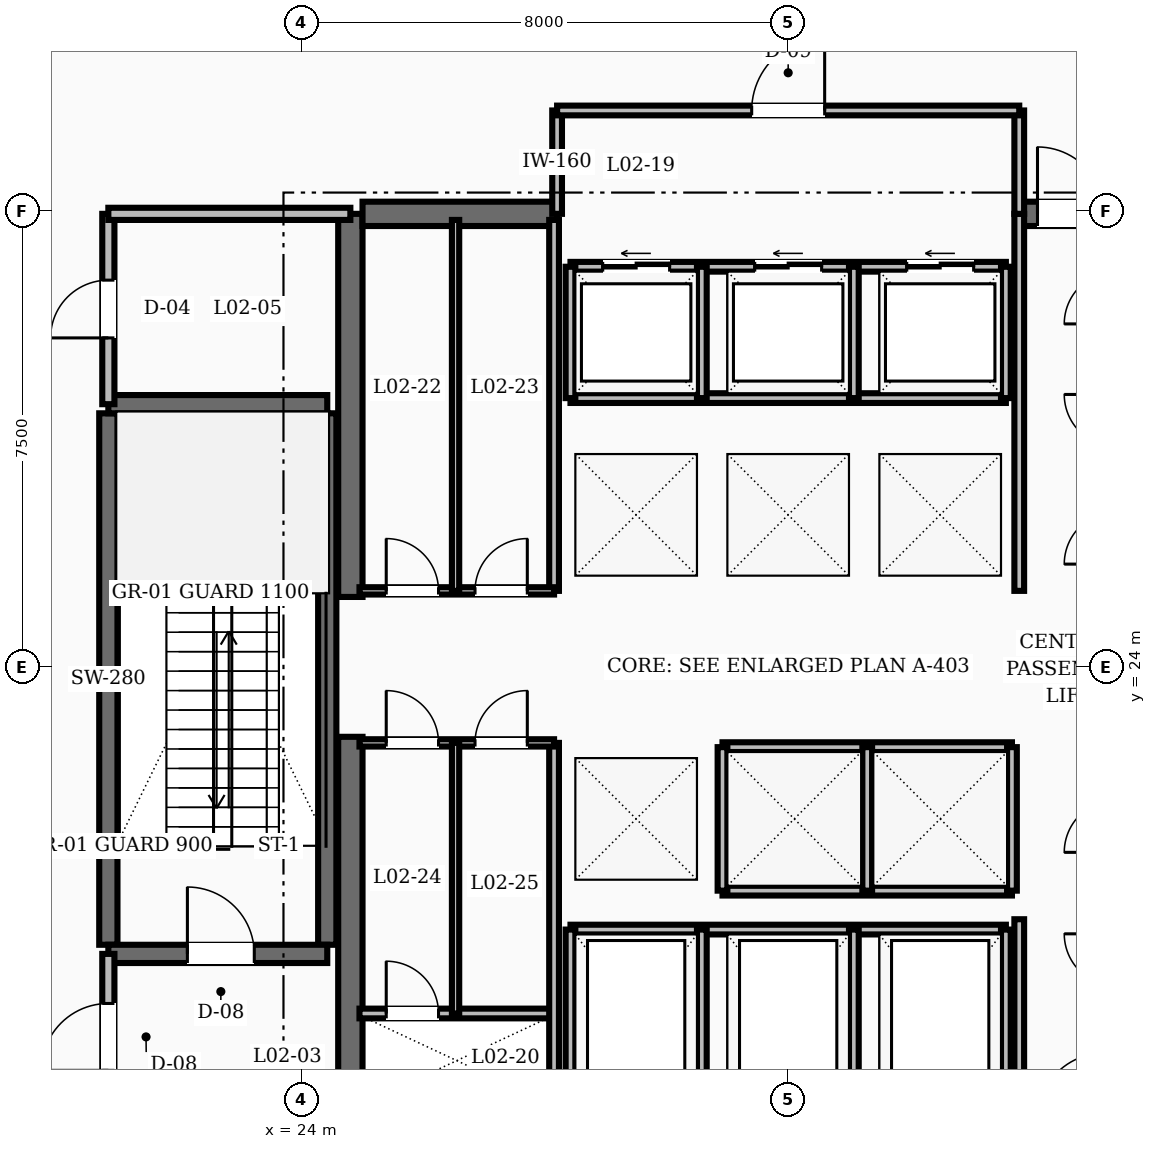
"""IFC4 building model, lengths in metres.
Left out: names, types, materials, properties, quantities, classifications, styles, units other than length and angle.
Written with IfcOpenShell. Run it as: python <this file> out.ifc"""

import sys

from ifc_helpers import new_model, si_unit, direction, frame, frame_2d, origin, place, context, subcontext, project, spatial, rectangle, extrude, element, fill, save


model = new_model("IFC4")
c1 = context("Model", 3, precision=1e-05, world=origin(), true_north=direction((0.0, 1.0)))
c2 = subcontext(c1, "Body", "Model", "MODEL_VIEW")
j1 = project(units=[si_unit("LENGTHUNIT", "METRE"), si_unit("PLANEANGLEUNIT", "RADIAN")], contexts=[c1])
p1 = place(None, origin())
s1 = spatial("IfcSite", under=j1, at=p1, CompositionType="ELEMENT")
p2 = place(p1, origin())
s2 = spatial("IfcBuilding", under=s1, at=p2, CompositionType="ELEMENT")
p3 = place(p2, frame((0.0, 0.0, 10.0)))
s3 = spatial("IfcBuildingStorey", under=s2, at=p3, CompositionType="ELEMENT", Elevation=10.0)
for number, where, z_axis, x_axis in (
    (1, (24.8, 16.55, 0.0), (0.0, 0.0, 1.0), (0.0, 1.0, 0.0)),
    (2, (24.8, 25.15, 0.0), (0.0, 0.0, 1.0), (0.0, 1.0, 0.0)),
):
    element("IfcWall", number, at=place(p3, frame(where, z_axis=z_axis, x_axis=x_axis)), inside=s3, PredefinedType="SHEAR", context=c2, shape_type="SweptSolid", body=[
        extrude(rectangle(XDim=6.3, YDim=0.4, at=frame_2d((3.15, 0.0))), origin(), (0.0, 0.0, 1.0), 4.8),
    ])
p4 = place(p3, frame((25.0, 31.45, 0.0), z_axis=(0.0, 0.0, 1.0), x_axis=(1.0, 0.0, 0.0)))
e3 = element("IfcWall", 3, at=p4, inside=s3, PredefinedType="SHEAR", context=c2, shape_type="SweptSolid", body=[
    extrude(rectangle(XDim=3.2, YDim=0.4, at=frame_2d((1.6, 0.0))), origin(), (0.0, 0.0, 1.0), 4.8),
])
p5 = place(p3, frame((35.8, 31.45, 0.0), z_axis=(0.0, 0.0, 1.0), x_axis=(1.0, 0.0, 0.0)))
e4 = element("IfcWall", 4, at=p5, inside=s3, PredefinedType="SHEAR", context=c2, shape_type="SweptSolid", body=[
    extrude(rectangle(XDim=3.2, YDim=0.4, at=frame_2d((1.6, 0.0))), origin(), (0.0, 0.0, 1.0), 4.8),
])
p6 = place(p5, frame((0.3, 0.0, 0.0)))
e5 = element("IfcOpeningElement", 5, at=p6, cuts=e4, PredefinedType="OPENING", context=c2, shape_type="SweptSolid", body=[
    extrude(rectangle(XDim=1.1, YDim=2.1, at=frame_2d((0.55, 1.05))), frame((0.0, 0.21, 0.0), z_axis=(0.0, -1.0, 0.0), x_axis=(1.0, 0.0, 0.0)), (0.0, 0.0, 1.0), 0.42),
])
for number, where, z_axis, x_axis in (
    (6, (20.82, 19.43, 0.0), (0.0, 0.0, 1.0), (0.0, 1.0, 0.0)),
    (7, (24.42, 19.43, 0.0), (0.0, 0.0, 1.0), (0.0, 1.0, 0.0)),
):
    element("IfcWall", number, at=place(p3, frame(where, z_axis=z_axis, x_axis=x_axis)), inside=s3, PredefinedType="SHEAR", context=c2, shape_type="SweptSolid", body=[
        extrude(rectangle(XDim=8.74, YDim=0.3, at=frame_2d((4.37, 0.0))), origin(), (0.0, 0.0, 1.0), 4.8),
    ])
p7 = place(p3, frame((20.82, 19.28, 0.0), z_axis=(0.0, 0.0, 1.0), x_axis=(1.0, 0.0, 0.0)))
e8 = element("IfcWall", 8, at=p7, inside=s3, PredefinedType="SHEAR", context=c2, shape_type="SweptSolid", body=[
    extrude(rectangle(XDim=3.6, YDim=0.3, at=frame_2d((1.8, 0.0))), origin(), (0.0, 0.0, 1.0), 4.8),
])
p8 = place(p7, frame((1.3, 0.0, 0.0)))
e9 = element("IfcOpeningElement", 9, at=p8, cuts=e8, PredefinedType="OPENING", context=c2, shape_type="SweptSolid", body=[
    extrude(rectangle(XDim=1.1, YDim=2.1, at=frame_2d((0.55, 1.05))), frame((0.0, 0.16, 0.0), z_axis=(0.0, -1.0, 0.0), x_axis=(1.0, 0.0, 0.0)), (0.0, 0.0, 1.0), 0.32),
])
p9 = place(p3, frame((20.82, 28.32, 0.0), z_axis=(0.0, 0.0, 1.0), x_axis=(1.0, 0.0, 0.0)))
e10 = element("IfcWall", 10, at=p9, inside=s3, PredefinedType="SHEAR", context=c2, shape_type="SweptSolid", body=[
    extrude(rectangle(XDim=3.6, YDim=0.3, at=frame_2d((1.8, 0.0))), origin(), (0.0, 0.0, 1.0), 4.8),
])
p10 = place(p3, frame((20.82, 16.55, 0.0), z_axis=(0.0, 0.0, 1.0), x_axis=(0.0, 1.0, 0.0)))
e11 = element("IfcWall", 11, at=p10, inside=s3, PredefinedType="SOLIDWALL", context=c2, shape_type="SweptSolid", body=[
    extrude(rectangle(XDim=2.73, YDim=0.2, at=frame_2d((1.365, 0.0))), origin(), (0.0, 0.0, 1.0), 3.52),
])
p11 = place(p10, frame((0.815, 0.0, 0.0)))
e12 = element("IfcOpeningElement", 12, at=p11, cuts=e11, PredefinedType="OPENING", context=c2, shape_type="SweptSolid", body=[
    extrude(rectangle(XDim=1.1, YDim=2.1, at=frame_2d((0.55, 1.05))), frame((0.0, 0.11, 0.0), z_axis=(0.0, -1.0, 0.0), x_axis=(1.0, 0.0, 0.0)), (0.0, 0.0, 1.0), 0.22),
])
p12 = place(p3, frame((20.82, 28.32, 0.0), z_axis=(0.0, 0.0, 1.0), x_axis=(0.0, 1.0, 0.0)))
e13 = element("IfcWall", 13, at=p12, inside=s3, PredefinedType="SOLIDWALL", context=c2, shape_type="SweptSolid", body=[
    extrude(rectangle(XDim=3.13, YDim=0.2, at=frame_2d((1.565, 0.0))), origin(), (0.0, 0.0, 1.0), 3.52),
])
p13 = place(p12, frame((1.09, 0.0, 0.0)))
e14 = element("IfcOpeningElement", 14, at=p13, cuts=e13, PredefinedType="OPENING", context=c2, shape_type="SweptSolid", body=[
    extrude(rectangle(XDim=0.95, YDim=2.1, at=frame_2d((0.475, 1.05))), frame((0.0, 0.11, 0.0), z_axis=(0.0, -1.0, 0.0), x_axis=(1.0, 0.0, 0.0)), (0.0, 0.0, 1.0), 0.22),
])
p14 = place(p3, frame((20.82, 31.45, 0.0), z_axis=(0.0, 0.0, 1.0), x_axis=(1.0, 0.0, 0.0)))
e15 = element("IfcWall", 15, at=p14, inside=s3, PredefinedType="SOLIDWALL", context=c2, shape_type="SweptSolid", body=[
    extrude(rectangle(XDim=3.98, YDim=0.2, at=frame_2d((1.99, 0.0))), origin(), (0.0, 0.0, 1.0), 3.52),
])
p15 = place(p3, frame((35.8, 16.55, 0.0), z_axis=(0.0, 0.0, 1.0), x_axis=(0.0, 1.0, 0.0)))
e16 = element("IfcWall", 16, at=p15, inside=s3, PredefinedType="SOLIDWALL", context=c2, shape_type="SweptSolid", body=[
    extrude(rectangle(XDim=3.3, YDim=0.16, at=frame_2d((1.65, 0.0))), origin(), (0.0, 0.0, 1.0), 3.52),
])
p16 = place(p3, frame((35.8, 25.25, 0.0), z_axis=(0.0, 0.0, 1.0), x_axis=(0.0, 1.0, 0.0)))
e17 = element("IfcWall", 17, at=p16, inside=s3, PredefinedType="SOLIDWALL", context=c2, shape_type="SweptSolid", body=[
    extrude(rectangle(XDim=6.2, YDim=0.16, at=frame_2d((3.1, 0.0))), origin(), (0.0, 0.0, 1.0), 3.52),
])
p17 = place(p3, frame((28.42, 30.58, 0.0), z_axis=(0.0, 0.0, 1.0), x_axis=(1.0, 0.0, 0.0)))
e18 = element("IfcWall", 18, at=p17, inside=s3, PredefinedType="SOLIDWALL", context=c2, shape_type="SweptSolid", body=[
    extrude(rectangle(XDim=7.16, YDim=0.16, at=frame_2d((3.58, 0.0))), origin(), (0.0, 0.0, 1.0), 3.52),
])
p18 = place(p17, frame((0.53, 0.0, 0.0)))
e19 = element("IfcOpeningElement", 19, at=p18, cuts=e18, PredefinedType="OPENING", context=c2, shape_type="SweptSolid", body=[
    extrude(rectangle(XDim=1.1, YDim=2.15, at=frame_2d((0.55, 1.075))), frame((0.0, 0.09, 0.0), z_axis=(0.0, -1.0, 0.0), x_axis=(1.0, 0.0, 0.0)), (0.0, 0.0, 1.0), 0.18),
])
p19 = place(p17, frame((3.03, 0.0, 0.0)))
e20 = element("IfcOpeningElement", 20, at=p19, cuts=e18, PredefinedType="OPENING", context=c2, shape_type="SweptSolid", body=[
    extrude(rectangle(XDim=1.1, YDim=2.15, at=frame_2d((0.55, 1.075))), frame((0.0, 0.09, 0.0), z_axis=(0.0, -1.0, 0.0), x_axis=(1.0, 0.0, 0.0)), (0.0, 0.0, 1.0), 0.18),
])
p20 = place(p17, frame((5.53, 0.0, 0.0)))
e21 = element("IfcOpeningElement", 21, at=p20, cuts=e18, PredefinedType="OPENING", context=c2, shape_type="SweptSolid", body=[
    extrude(rectangle(XDim=1.1, YDim=2.15, at=frame_2d((0.55, 1.075))), frame((0.0, 0.09, 0.0), z_axis=(0.0, -1.0, 0.0), x_axis=(1.0, 0.0, 0.0)), (0.0, 0.0, 1.0), 0.18),
])
p21 = place(p3, frame((28.42, 28.42, 0.0), z_axis=(0.0, 0.0, 1.0), x_axis=(1.0, 0.0, 0.0)))
e22 = element("IfcWall", 22, at=p21, inside=s3, PredefinedType="SOLIDWALL", context=c2, shape_type="SweptSolid", body=[
    extrude(rectangle(XDim=7.16, YDim=0.16, at=frame_2d((3.58, 0.0))), origin(), (0.0, 0.0, 1.0), 3.52),
])
for number, where, z_axis, x_axis in (
    (23, (28.42, 28.42, 0.0), (0.0, 0.0, 1.0), (0.0, 1.0, 0.0)),
    (24, (30.58, 28.42, 0.0), (0.0, 0.0, 1.0), (0.0, 1.0, 0.0)),
    (25, (33.08, 28.42, 0.0), (0.0, 0.0, 1.0), (0.0, 1.0, 0.0)),
    (26, (35.58, 28.42, 0.0), (0.0, 0.0, 1.0), (0.0, 1.0, 0.0)),
):
    element("IfcWall", number, at=place(p3, frame(where, z_axis=z_axis, x_axis=x_axis)), inside=s3, PredefinedType="SOLIDWALL", context=c2, shape_type="SweptSolid", body=[
        extrude(rectangle(XDim=2.16, YDim=0.16, at=frame_2d((1.08, 0.0))), origin(), (0.0, 0.0, 1.0), 3.52),
    ])
for number, where, z_axis, x_axis in (
    (27, (30.92, 22.68, 0.0), (0.0, 0.0, 1.0), (1.0, 0.0, 0.0)),
    (28, (30.92, 20.32, 0.0), (0.0, 0.0, 1.0), (1.0, 0.0, 0.0)),
):
    element("IfcWall", number, at=place(p3, frame(where, z_axis=z_axis, x_axis=x_axis)), inside=s3, PredefinedType="SOLIDWALL", context=c2, shape_type="SweptSolid", body=[
        extrude(rectangle(XDim=4.76, YDim=0.16, at=frame_2d((2.38, 0.0))), origin(), (0.0, 0.0, 1.0), 3.52),
    ])
for number, where, z_axis, x_axis in (
    (29, (30.92, 20.32, 0.0), (0.0, 0.0, 1.0), (0.0, 1.0, 0.0)),
    (30, (33.3, 20.32, 0.0), (0.0, 0.0, 1.0), (0.0, 1.0, 0.0)),
    (31, (35.68, 20.32, 0.0), (0.0, 0.0, 1.0), (0.0, 1.0, 0.0)),
):
    element("IfcWall", number, at=place(p3, frame(where, z_axis=z_axis, x_axis=x_axis)), inside=s3, PredefinedType="SOLIDWALL", context=c2, shape_type="SweptSolid", body=[
        extrude(rectangle(XDim=2.36, YDim=0.16, at=frame_2d((1.18, 0.0))), origin(), (0.0, 0.0, 1.0), 3.52),
    ])
p22 = place(p3, frame((28.42, 19.68, 0.0), z_axis=(0.0, 0.0, 1.0), x_axis=(1.0, 0.0, 0.0)))
e32 = element("IfcWall", 32, at=p22, inside=s3, PredefinedType="SOLIDWALL", context=c2, shape_type="SweptSolid", body=[
    extrude(rectangle(XDim=7.16, YDim=0.16, at=frame_2d((3.58, 0.0))), origin(), (0.0, 0.0, 1.0), 3.52),
])
for number, where, z_axis, x_axis in (
    (33, (28.42, 16.92, 0.0), (0.0, 0.0, 1.0), (0.0, 1.0, 0.0)),
    (34, (30.58, 16.92, 0.0), (0.0, 0.0, 1.0), (0.0, 1.0, 0.0)),
    (35, (33.08, 16.92, 0.0), (0.0, 0.0, 1.0), (0.0, 1.0, 0.0)),
    (36, (35.58, 16.92, 0.0), (0.0, 0.0, 1.0), (0.0, 1.0, 0.0)),
):
    element("IfcWall", number, at=place(p3, frame(where, z_axis=z_axis, x_axis=x_axis)), inside=s3, PredefinedType="SOLIDWALL", context=c2, shape_type="SweptSolid", body=[
        extrude(rectangle(XDim=2.76, YDim=0.16, at=frame_2d((1.38, 0.0))), origin(), (0.0, 0.0, 1.0), 3.52),
    ])
for number, where, z_axis, x_axis in (
    (37, (28.2, 31.45, 0.0), (0.0, 0.0, 1.0), (0.0, 1.0, 0.0)),
    (38, (35.8, 31.45, 0.0), (0.0, 0.0, 1.0), (0.0, 1.0, 0.0)),
):
    element("IfcWall", number, at=place(p3, frame(where, z_axis=z_axis, x_axis=x_axis)), inside=s3, PredefinedType="SOLIDWALL", context=c2, shape_type="SweptSolid", body=[
        extrude(rectangle(XDim=1.7, YDim=0.16, at=frame_2d((0.85, 0.0))), origin(), (0.0, 0.0, 1.0), 3.52),
    ])
p23 = place(p3, frame((28.2, 33.15, 0.0), z_axis=(0.0, 0.0, 1.0), x_axis=(1.0, 0.0, 0.0)))
e39 = element("IfcWall", 39, at=p23, inside=s3, PredefinedType="SOLIDWALL", context=c2, shape_type="SweptSolid", body=[
    extrude(rectangle(XDim=7.6, YDim=0.16, at=frame_2d((3.8, 0.0))), origin(), (0.0, 0.0, 1.0), 3.52),
])
p24 = place(p23, frame((3.2, 0.0, 0.0)))
e40 = element("IfcOpeningElement", 40, at=p24, cuts=e39, PredefinedType="OPENING", context=c2, shape_type="SweptSolid", body=[
    extrude(rectangle(XDim=1.2, YDim=2.1, at=frame_2d((0.6, 1.05))), frame((0.0, 0.09, 0.0), z_axis=(0.0, -1.0, 0.0), x_axis=(1.0, 0.0, 0.0)), (0.0, 0.0, 1.0), 0.18),
])
p25 = place(p3, frame((24.95, 18.3, 0.0), z_axis=(0.0, 0.0, 1.0), x_axis=(1.0, 0.0, 0.0)))
e41 = element("IfcWall", 41, at=p25, inside=s3, PredefinedType="SOLIDWALL", context=c2, shape_type="SweptSolid", body=[
    extrude(rectangle(XDim=3.2, YDim=0.16, at=frame_2d((1.6, 0.0))), origin(), (0.0, 0.0, 1.0), 3.52),
])
p26 = place(p25, frame((0.44, 0.0, 0.0)))
e42 = element("IfcOpeningElement", 42, at=p26, cuts=e41, PredefinedType="OPENING", context=c2, shape_type="SweptSolid", body=[
    extrude(rectangle(XDim=0.86, YDim=2.05, at=frame_2d((0.43, 1.025))), frame((0.0, 0.09, 0.0), z_axis=(0.0, -1.0, 0.0), x_axis=(1.0, 0.0, 0.0)), (0.0, 0.0, 1.0), 0.18),
])
p27 = place(p3, frame((28.15, 16.7, 0.0), z_axis=(0.0, 0.0, 1.0), x_axis=(0.0, 1.0, 0.0)))
e43 = element("IfcWall", 43, at=p27, inside=s3, PredefinedType="SOLIDWALL", context=c2, shape_type="SweptSolid", body=[
    extrude(rectangle(XDim=6.05, YDim=0.16, at=frame_2d((3.025, 0.0))), origin(), (0.0, 0.0, 1.0), 3.52),
])
p28 = place(p3, frame((28.15, 25.25, 0.0), z_axis=(0.0, 0.0, 1.0), x_axis=(0.0, 1.0, 0.0)))
e44 = element("IfcWall", 44, at=p28, inside=s3, PredefinedType="SOLIDWALL", context=c2, shape_type="SweptSolid", body=[
    extrude(rectangle(XDim=6.1, YDim=0.16, at=frame_2d((3.05, 0.0))), origin(), (0.0, 0.0, 1.0), 3.52),
])
p29 = place(p3, frame((24.95, 25.25, 0.0), z_axis=(0.0, 0.0, 1.0), x_axis=(1.0, 0.0, 0.0)))
e45 = element("IfcWall", 45, at=p29, inside=s3, PredefinedType="PARTITIONING", context=c2, shape_type="SweptSolid", body=[
    extrude(rectangle(XDim=3.2, YDim=0.12, at=frame_2d((1.6, 0.0))), origin(), (0.0, 0.0, 1.0), 3.52),
])
p30 = place(p29, frame((0.44, 0.0, 0.0)))
e46 = element("IfcOpeningElement", 46, at=p30, cuts=e45, PredefinedType="OPENING", context=c2, shape_type="SweptSolid", body=[
    extrude(rectangle(XDim=0.86, YDim=2.1, at=frame_2d((0.43, 1.05))), frame((0.0, 0.07, 0.0), z_axis=(0.0, -1.0, 0.0), x_axis=(1.0, 0.0, 0.0)), (0.0, 0.0, 1.0), 0.14),
])
p31 = place(p29, frame((1.9, 0.0, 0.0)))
e47 = element("IfcOpeningElement", 47, at=p31, cuts=e45, PredefinedType="OPENING", context=c2, shape_type="SweptSolid", body=[
    extrude(rectangle(XDim=0.86, YDim=2.1, at=frame_2d((0.43, 1.05))), frame((0.0, 0.07, 0.0), z_axis=(0.0, -1.0, 0.0), x_axis=(1.0, 0.0, 0.0)), (0.0, 0.0, 1.0), 0.14),
])
p32 = place(p3, frame((24.95, 22.75, 0.0), z_axis=(0.0, 0.0, 1.0), x_axis=(1.0, 0.0, 0.0)))
e48 = element("IfcWall", 48, at=p32, inside=s3, PredefinedType="PARTITIONING", context=c2, shape_type="SweptSolid", body=[
    extrude(rectangle(XDim=3.2, YDim=0.12, at=frame_2d((1.6, 0.0))), origin(), (0.0, 0.0, 1.0), 3.52),
])
p33 = place(p32, frame((0.44, 0.0, 0.0)))
e49 = element("IfcOpeningElement", 49, at=p33, cuts=e48, PredefinedType="OPENING", context=c2, shape_type="SweptSolid", body=[
    extrude(rectangle(XDim=0.86, YDim=2.1, at=frame_2d((0.43, 1.05))), frame((0.0, 0.07, 0.0), z_axis=(0.0, -1.0, 0.0), x_axis=(1.0, 0.0, 0.0)), (0.0, 0.0, 1.0), 0.14),
])
p34 = place(p32, frame((1.9, 0.0, 0.0)))
e50 = element("IfcOpeningElement", 50, at=p34, cuts=e48, PredefinedType="OPENING", context=c2, shape_type="SweptSolid", body=[
    extrude(rectangle(XDim=0.86, YDim=2.1, at=frame_2d((0.43, 1.05))), frame((0.0, 0.07, 0.0), z_axis=(0.0, -1.0, 0.0), x_axis=(1.0, 0.0, 0.0)), (0.0, 0.0, 1.0), 0.14),
])
p35 = place(p3, frame((26.53, 25.25, 0.0), z_axis=(0.0, 0.0, 1.0), x_axis=(0.0, 1.0, 0.0)))
e51 = element("IfcWall", 51, at=p35, inside=s3, PredefinedType="PARTITIONING", context=c2, shape_type="SweptSolid", body=[
    extrude(rectangle(XDim=6.1, YDim=0.12, at=frame_2d((3.05, 0.0))), origin(), (0.0, 0.0, 1.0), 3.52),
])
p36 = place(p3, frame((26.53, 18.3, 0.0), z_axis=(0.0, 0.0, 1.0), x_axis=(0.0, 1.0, 0.0)))
e52 = element("IfcWall", 52, at=p36, inside=s3, PredefinedType="PARTITIONING", context=c2, shape_type="SweptSolid", body=[
    extrude(rectangle(XDim=4.45, YDim=0.12, at=frame_2d((2.225, 0.0))), origin(), (0.0, 0.0, 1.0), 3.52),
])
p37 = place(p8, origin())
e53 = element("IfcDoor", 53, at=p37, inside=s3, OperationType="SINGLE_SWING_LEFT", PredefinedType="DOOR", context=c2, shape_type="SweptSolid", body=[
    extrude(rectangle(XDim=1.1, YDim=2.1, at=frame_2d((0.55, 1.05))), frame((0.0, 0.025, 0.0), z_axis=(0.0, -1.0, 0.0), x_axis=(1.0, 0.0, 0.0)), (0.0, 0.0, 1.0), 0.05),
])
fill(e9, e53)
p38 = place(p11, origin())
e54 = element("IfcDoor", 54, at=p38, inside=s3, OperationType="SINGLE_SWING_LEFT", PredefinedType="DOOR", context=c2, shape_type="SweptSolid", body=[
    extrude(rectangle(XDim=1.1, YDim=2.1, at=frame_2d((0.55, 1.05))), frame((0.0, 0.025, 0.0), z_axis=(0.0, -1.0, 0.0), x_axis=(1.0, 0.0, 0.0)), (0.0, 0.0, 1.0), 0.05),
])
fill(e12, e54)
p39 = place(p13, origin())
e55 = element("IfcDoor", 55, at=p39, inside=s3, OperationType="SINGLE_SWING_LEFT", PredefinedType="DOOR", context=c2, shape_type="SweptSolid", body=[
    extrude(rectangle(XDim=0.95, YDim=2.1, at=frame_2d((0.475, 1.05))), frame((0.0, 0.025, 0.0), z_axis=(0.0, -1.0, 0.0), x_axis=(1.0, 0.0, 0.0)), (0.0, 0.0, 1.0), 0.05),
])
fill(e14, e55)
p40 = place(p6, origin())
e56 = element("IfcDoor", 56, at=p40, inside=s3, OperationType="SINGLE_SWING_LEFT", PredefinedType="DOOR", context=c2, shape_type="SweptSolid", body=[
    extrude(rectangle(XDim=1.1, YDim=2.1, at=frame_2d((0.55, 1.05))), frame((0.0, 0.025, 0.0), z_axis=(0.0, -1.0, 0.0), x_axis=(1.0, 0.0, 0.0)), (0.0, 0.0, 1.0), 0.05),
])
fill(e5, e56)
p41 = place(p18, origin())
e57 = element("IfcDoor", 57, at=p41, inside=s3, OperationType="SLIDING_TO_LEFT", PredefinedType="DOOR", context=c2, shape_type="SweptSolid", body=[
    extrude(rectangle(XDim=1.1, YDim=2.15, at=frame_2d((0.55, 1.075))), frame((0.0, 0.025, 0.0), z_axis=(0.0, -1.0, 0.0), x_axis=(1.0, 0.0, 0.0)), (0.0, 0.0, 1.0), 0.05),
])
fill(e19, e57)
p42 = place(p19, origin())
e58 = element("IfcDoor", 58, at=p42, inside=s3, OperationType="SLIDING_TO_LEFT", PredefinedType="DOOR", context=c2, shape_type="SweptSolid", body=[
    extrude(rectangle(XDim=1.1, YDim=2.15, at=frame_2d((0.55, 1.075))), frame((0.0, 0.025, 0.0), z_axis=(0.0, -1.0, 0.0), x_axis=(1.0, 0.0, 0.0)), (0.0, 0.0, 1.0), 0.05),
])
fill(e20, e58)
p43 = place(p20, origin())
e59 = element("IfcDoor", 59, at=p43, inside=s3, OperationType="SLIDING_TO_LEFT", PredefinedType="DOOR", context=c2, shape_type="SweptSolid", body=[
    extrude(rectangle(XDim=1.1, YDim=2.15, at=frame_2d((0.55, 1.075))), frame((0.0, 0.025, 0.0), z_axis=(0.0, -1.0, 0.0), x_axis=(1.0, 0.0, 0.0)), (0.0, 0.0, 1.0), 0.05),
])
fill(e21, e59)
p44 = place(p24, origin())
e60 = element("IfcDoor", 60, at=p44, inside=s3, OperationType="SINGLE_SWING_RIGHT", PredefinedType="DOOR", context=c2, shape_type="SweptSolid", body=[
    extrude(rectangle(XDim=1.2, YDim=2.1, at=frame_2d((0.6, 1.05))), frame((0.0, 0.025, 0.0), z_axis=(0.0, -1.0, 0.0), x_axis=(1.0, 0.0, 0.0)), (0.0, 0.0, 1.0), 0.05),
])
fill(e40, e60)
p45 = place(p26, origin())
e61 = element("IfcDoor", 61, at=p45, inside=s3, OperationType="SINGLE_SWING_LEFT", PredefinedType="TRAPDOOR", context=c2, shape_type="SweptSolid", body=[
    extrude(rectangle(XDim=0.86, YDim=2.05, at=frame_2d((0.43, 1.025))), frame((0.0, 0.025, 0.0), z_axis=(0.0, -1.0, 0.0), x_axis=(1.0, 0.0, 0.0)), (0.0, 0.0, 1.0), 0.05),
])
fill(e42, e61)
p46 = place(p30, origin())
e62 = element("IfcDoor", 62, at=p46, inside=s3, OperationType="SINGLE_SWING_LEFT", PredefinedType="DOOR", context=c2, shape_type="SweptSolid", body=[
    extrude(rectangle(XDim=0.86, YDim=2.1, at=frame_2d((0.43, 1.05))), frame((0.0, 0.025, 0.0), z_axis=(0.0, -1.0, 0.0), x_axis=(1.0, 0.0, 0.0)), (0.0, 0.0, 1.0), 0.05),
])
fill(e46, e62)
p47 = place(p31, origin())
e63 = element("IfcDoor", 63, at=p47, inside=s3, OperationType="SINGLE_SWING_RIGHT", PredefinedType="DOOR", context=c2, shape_type="SweptSolid", body=[
    extrude(rectangle(XDim=0.86, YDim=2.1, at=frame_2d((0.43, 1.05))), frame((0.0, 0.025, 0.0), z_axis=(0.0, -1.0, 0.0), x_axis=(1.0, 0.0, 0.0)), (0.0, 0.0, 1.0), 0.05),
])
fill(e47, e63)
p48 = place(p33, origin())
e64 = element("IfcDoor", 64, at=p48, inside=s3, OperationType="SINGLE_SWING_LEFT", PredefinedType="DOOR", context=c2, shape_type="SweptSolid", body=[
    extrude(rectangle(XDim=0.86, YDim=2.1, at=frame_2d((0.43, 1.05))), frame((0.0, 0.025, 0.0), z_axis=(0.0, -1.0, 0.0), x_axis=(1.0, 0.0, 0.0)), (0.0, 0.0, 1.0), 0.05),
])
fill(e49, e64)
p49 = place(p34, origin())
e65 = element("IfcDoor", 65, at=p49, inside=s3, OperationType="SINGLE_SWING_RIGHT", PredefinedType="DOOR", context=c2, shape_type="SweptSolid", body=[
    extrude(rectangle(XDim=0.86, YDim=2.1, at=frame_2d((0.43, 1.05))), frame((0.0, 0.025, 0.0), z_axis=(0.0, -1.0, 0.0), x_axis=(1.0, 0.0, 0.0)), (0.0, 0.0, 1.0), 0.05),
])
fill(e50, e65)
save(model, sys.argv[1])
